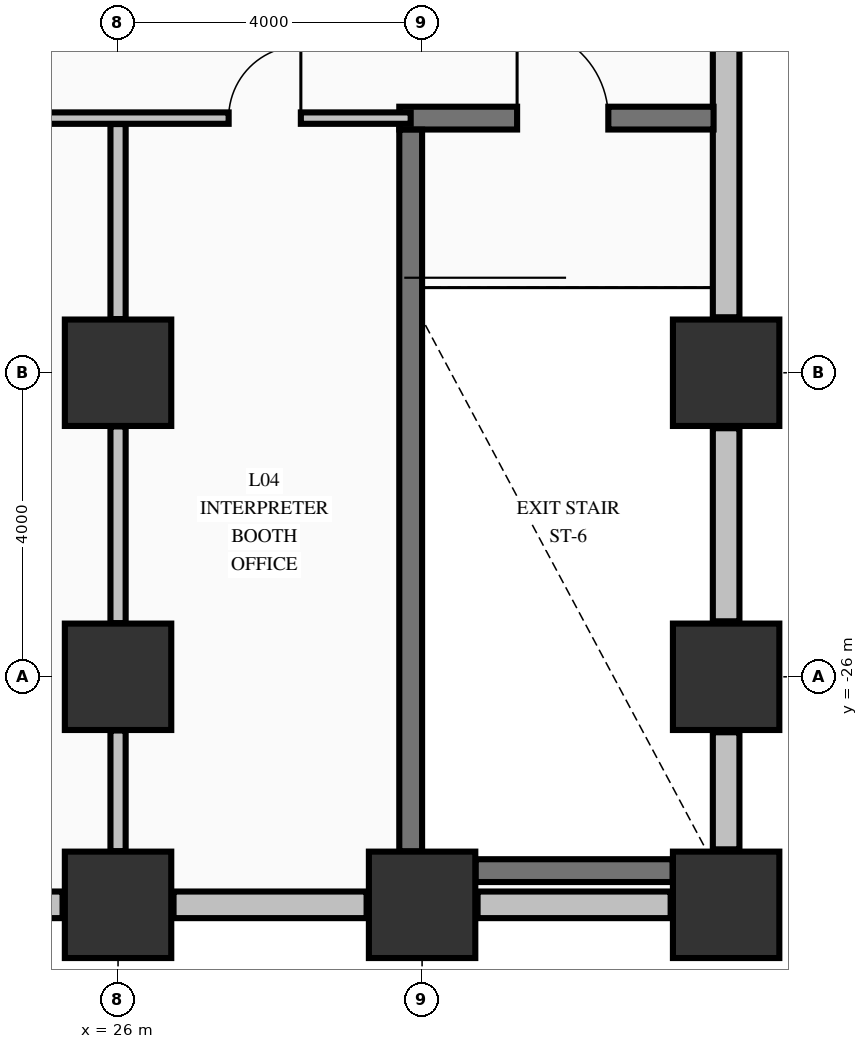
"""IFC4 building model, lengths in metres.
Left out: names, types, materials, properties, quantities, classifications, styles, units other than length and angle.
Written with IfcOpenShell. Run it as: python <this file> out.ifc"""

import sys

from ifc_helpers import new_model, si_unit, direction, frame, frame_2d, origin, origin_2d, place, context, subcontext, project, spatial, rectangle, extrude, element, fill, save


model = new_model("IFC4")
c1 = context("Model", 3, precision=1e-05, world=origin(), true_north=direction((0.0, 1.0)))
c2 = subcontext(c1, "Body", "Model", "MODEL_VIEW")
j1 = project(units=[si_unit("LENGTHUNIT", "METRE"), si_unit("PLANEANGLEUNIT", "RADIAN")], contexts=[c1])
p1 = place(None, origin())
s1 = spatial("IfcSite", under=j1, at=p1, CompositionType="ELEMENT")
p2 = place(p1, origin())
s2 = spatial("IfcBuilding", under=s1, at=p2, CompositionType="ELEMENT")
p3 = place(p2, frame((0.0, 0.0, 21.76)))
s3 = spatial("IfcBuildingStorey", under=s2, at=p3, CompositionType="ELEMENT", Elevation=21.76)
for number, where, z_axis, x_axis in (
    (1, (26.0, -29.0, -0.45), (0.0, 0.0, 1.0), (1.0, 0.0, 0.0)),
    (2, (26.0, -26.0, -0.45), (0.0, 0.0, 1.0), (1.0, 0.0, 0.0)),
    (3, (26.0, -22.0, -0.45), (0.0, 0.0, 1.0), (1.0, 0.0, 0.0)),
    (4, (30.0, -29.0, -0.45), (0.0, 0.0, 1.0), (1.0, 0.0, 0.0)),
    (5, (34.0, -29.0, -0.45), (0.0, 0.0, 1.0), (1.0, 0.0, 0.0)),
    (6, (34.0, -26.0, -0.45), (0.0, 0.0, 1.0), (1.0, 0.0, 0.0)),
    (7, (34.0, -22.0, -0.45), (0.0, 0.0, 1.0), (1.0, 0.0, 0.0)),
):
    element("IfcColumn", number, at=place(p3, frame(where, z_axis=z_axis, x_axis=x_axis)), inside=s3, PredefinedType="COLUMN", context=c2, shape_type="SweptSolid", body=[
        extrude(rectangle(XDim=1.4, YDim=1.4, at=origin_2d()), origin(), (0.0, 0.0, 1.0), 5.44),
    ])
p4 = place(p3, frame((23.0, -29.0, 0.0), z_axis=(0.0, 0.0, 1.0), x_axis=(1.0, 0.0, 0.0)))
e8 = element("IfcWall", 8, at=p4, inside=s3, PredefinedType="STANDARD", context=c2, shape_type="SweptSolid", body=[
    extrude(rectangle(XDim=2.27, YDim=0.35, at=frame_2d((1.135, 0.0))), origin(), (0.0, 0.0, 1.0), 3.332),
])
for number, where, z_axis, x_axis in (
    (9, (26.73, -29.0, 0.0), (0.0, 0.0, 1.0), (1.0, 0.0, 0.0)),
    (10, (30.73, -29.0, 0.0), (0.0, 0.0, 1.0), (1.0, 0.0, 0.0)),
):
    element("IfcWall", number, at=place(p3, frame(where, z_axis=z_axis, x_axis=x_axis)), inside=s3, PredefinedType="STANDARD", context=c2, shape_type="SweptSolid", body=[
        extrude(rectangle(XDim=2.54, YDim=0.35, at=frame_2d((1.27, 0.0))), origin(), (0.0, 0.0, 1.0), 3.332),
    ])
p5 = place(p3, frame((34.0, -26.73, 0.0), z_axis=(0.0, 0.0, 1.0), x_axis=(0.0, -1.0, 0.0)))
e11 = element("IfcWall", 11, at=p5, inside=s3, PredefinedType="STANDARD", context=c2, shape_type="SweptSolid", body=[
    extrude(rectangle(XDim=1.54, YDim=0.35, at=frame_2d((0.77, 0.0))), origin(), (0.0, 0.0, 1.0), 4.99),
])
p6 = place(p3, frame((34.0, -22.73, 0.0), z_axis=(0.0, 0.0, 1.0), x_axis=(0.0, -1.0, 0.0)))
e12 = element("IfcWall", 12, at=p6, inside=s3, PredefinedType="STANDARD", context=c2, shape_type="SweptSolid", body=[
    extrude(rectangle(XDim=2.54, YDim=0.35, at=frame_2d((1.27, 0.0))), origin(), (0.0, 0.0, 1.0), 4.99),
])
p7 = place(p3, frame((34.0, -16.73, 0.0), z_axis=(0.0, 0.0, 1.0), x_axis=(0.0, -1.0, 0.0)))
e13 = element("IfcWall", 13, at=p7, inside=s3, PredefinedType="STANDARD", context=c2, shape_type="SweptSolid", body=[
    extrude(rectangle(XDim=4.54, YDim=0.35, at=frame_2d((2.27, 0.0))), origin(), (0.0, 0.0, 1.0), 4.99),
])
p8 = place(p3, frame((30.704, -28.55, 0.0), z_axis=(0.0, 0.0, 1.0), x_axis=(1.0, 0.0, 0.0)))
e14 = element("IfcWall", 14, at=p8, inside=s3, PredefinedType="SHEAR", context=c2, shape_type="SweptSolid", body=[
    extrude(rectangle(XDim=2.592, YDim=0.3, at=frame_2d((1.296, 0.0))), origin(), (0.0, 0.0, 1.0), 4.99),
])
p9 = place(p3, frame((29.7, -18.65, 0.0), z_axis=(0.0, 0.0, 1.0), x_axis=(1.0, 0.0, 0.0)))
e15 = element("IfcWall", 15, at=p9, inside=s3, PredefinedType="SHEAR", context=c2, shape_type="SweptSolid", body=[
    extrude(rectangle(XDim=4.135, YDim=0.3, at=frame_2d((2.067, 0.0))), origin(), (0.0, 0.0, 1.0), 4.99),
])
p10 = place(p9, frame((1.55, 0.0, 0.0)))
e16 = element("IfcOpeningElement", 16, at=p10, cuts=e15, PredefinedType="OPENING", context=c2, shape_type="SweptSolid", body=[
    extrude(rectangle(XDim=1.2, YDim=2.15, at=frame_2d((0.6, 1.075))), frame((0.0, 0.16, 0.0), z_axis=(0.0, -1.0, 0.0), x_axis=(1.0, 0.0, 0.0)), (0.0, 0.0, 1.0), 0.32),
])
p11 = place(p3, frame((10.9, -18.65, 0.0), z_axis=(0.0, 0.0, 1.0), x_axis=(1.0, 0.0, 0.0)))
e17 = element("IfcWall", 17, at=p11, inside=s3, PredefinedType="PARTITIONING", context=c2, shape_type="SweptSolid", body=[
    extrude(rectangle(XDim=18.95, YDim=0.15, at=frame_2d((9.475, 0.0))), origin(), (0.0, 0.0, 1.0), 4.99),
])
p12 = place(p11, frame((4.0, 0.0, 0.0)))
e18 = element("IfcOpeningElement", 18, at=p12, cuts=e17, PredefinedType="OPENING", context=c2, shape_type="SweptSolid", body=[
    extrude(rectangle(XDim=1.2, YDim=2.15, at=frame_2d((0.6, 1.075))), frame((0.0, 0.085, 0.0), z_axis=(0.0, -1.0, 0.0), x_axis=(1.0, 0.0, 0.0)), (0.0, 0.0, 1.0), 0.17),
])
p13 = place(p11, frame((11.625, 0.0, 0.0)))
e19 = element("IfcOpeningElement", 19, at=p13, cuts=e17, PredefinedType="OPENING", context=c2, shape_type="SweptSolid", body=[
    extrude(rectangle(XDim=0.95, YDim=2.15, at=frame_2d((0.475, 1.075))), frame((0.0, 0.085, 0.0), z_axis=(0.0, -1.0, 0.0), x_axis=(1.0, 0.0, 0.0)), (0.0, 0.0, 1.0), 0.17),
])
p14 = place(p11, frame((16.555, 0.0, 0.0)))
e20 = element("IfcOpeningElement", 20, at=p14, cuts=e17, PredefinedType="OPENING", context=c2, shape_type="SweptSolid", body=[
    extrude(rectangle(XDim=0.95, YDim=2.15, at=frame_2d((0.475, 1.075))), frame((0.0, 0.085, 0.0), z_axis=(0.0, -1.0, 0.0), x_axis=(1.0, 0.0, 0.0)), (0.0, 0.0, 1.0), 0.17),
])
p15 = place(p3, frame((29.85, -28.296, 0.0), z_axis=(0.0, 0.0, 1.0), x_axis=(0.0, 1.0, 0.0)))
e21 = element("IfcWall", 21, at=p15, inside=s3, PredefinedType="SHEAR", context=c2, shape_type="SweptSolid", body=[
    extrude(rectangle(XDim=9.494, YDim=0.3, at=frame_2d((4.747, 0.0))), origin(), (0.0, 0.0, 1.0), 4.99),
])
p16 = place(p3, frame((26.0, -28.294, 0.0), z_axis=(0.0, 0.0, 1.0), x_axis=(0.0, 1.0, 0.0)))
e22 = element("IfcWall", 22, at=p16, inside=s3, PredefinedType="PARTITIONING", context=c2, shape_type="SweptSolid", body=[
    extrude(rectangle(XDim=1.588, YDim=0.2, at=frame_2d((0.794, 0.0))), origin(), (0.0, 0.0, 1.0), 3.332),
])
p17 = place(p3, frame((26.0, -25.294, 0.0), z_axis=(0.0, 0.0, 1.0), x_axis=(0.0, 1.0, 0.0)))
e23 = element("IfcWall", 23, at=p17, inside=s3, PredefinedType="PARTITIONING", context=c2, shape_type="SweptSolid", body=[
    extrude(rectangle(XDim=2.588, YDim=0.2, at=frame_2d((1.294, 0.0))), origin(), (0.0, 0.0, 1.0), 3.332),
])
p18 = place(p3, frame((26.0, -21.294, 0.0), z_axis=(0.0, 0.0, 1.0), x_axis=(0.0, 1.0, 0.0)))
e24 = element("IfcWall", 24, at=p18, inside=s3, PredefinedType="PARTITIONING", context=c2, shape_type="SweptSolid", body=[
    extrude(rectangle(XDim=2.566, YDim=0.2, at=frame_2d((1.283, 0.0))), origin(), (0.0, 0.0, 1.0), 3.332),
])
p19 = place(p10, origin())
e25 = element("IfcDoor", 25, at=p19, inside=s3, OperationType="SINGLE_SWING_LEFT", PredefinedType="DOOR", context=c2, shape_type="SweptSolid", body=[
    extrude(rectangle(XDim=1.2, YDim=2.15, at=frame_2d((0.6, 1.075))), frame((0.0, 0.025, 0.0), z_axis=(0.0, -1.0, 0.0), x_axis=(1.0, 0.0, 0.0)), (0.0, 0.0, 1.0), 0.05),
])
fill(e16, e25)
p20 = place(p14, origin())
e26 = element("IfcDoor", 26, at=p20, inside=s3, OperationType="SINGLE_SWING_RIGHT", PredefinedType="DOOR", context=c2, shape_type="SweptSolid", body=[
    extrude(rectangle(XDim=0.95, YDim=2.15, at=frame_2d((0.475, 1.075))), frame((0.0, 0.025, 0.0), z_axis=(0.0, -1.0, 0.0), x_axis=(1.0, 0.0, 0.0)), (0.0, 0.0, 1.0), 0.05),
])
fill(e20, e26)
save(model, sys.argv[1])
